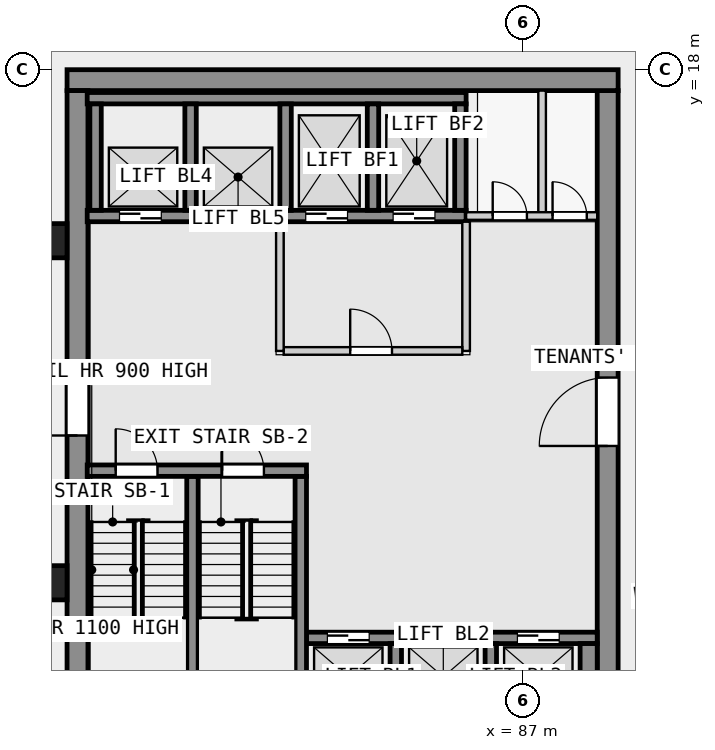
"""IFC4 building model, lengths in metres.
Left out: names, types, materials, properties, quantities, classifications, styles, units other than length and angle.
Written with IfcOpenShell. Run it as: python <this file> out.ifc"""

import sys

from ifc_helpers import new_model, si_unit, direction, frame, frame_2d, origin, origin_2d, place, context, subcontext, project, spatial, rectangle, extrude, element, fill, save


model = new_model("IFC4")
c1 = context("Model", 3, precision=1e-05, world=origin(), true_north=direction((0.0, 1.0)))
c2 = subcontext(c1, "Body", "Model", "MODEL_VIEW")
j1 = project(units=[si_unit("LENGTHUNIT", "METRE"), si_unit("PLANEANGLEUNIT", "RADIAN")], contexts=[c1])
p1 = place(None, origin())
s1 = spatial("IfcSite", under=j1, at=p1, CompositionType="ELEMENT")
p2 = place(p1, origin())
s2 = spatial("IfcBuilding", under=s1, at=p2, CompositionType="ELEMENT")
p3 = place(p2, frame((0.0, 0.0, 30.3)))
s3 = spatial("IfcBuildingStorey", under=s2, at=p3, CompositionType="ELEMENT", Elevation=30.3)
for number, where, z_axis, x_axis in (
    (1, (74.55, 13.5, 0.0), (0.0, 0.0, 1.0), (1.0, 0.0, 0.0)),
    (2, (74.55, 4.5, 0.0), (0.0, 0.0, 1.0), (1.0, 0.0, 0.0)),
):
    element("IfcColumn", number, at=place(p3, frame(where, z_axis=z_axis, x_axis=x_axis)), inside=s3, PredefinedType="COLUMN", context=c2, shape_type="SweptSolid", body=[
        extrude(rectangle(XDim=0.9, YDim=0.9, at=origin_2d()), origin(), (0.0, 0.0, 1.0), 3.5),
    ])
p4 = place(p3, frame((75.0, 17.725, 0.0), z_axis=(0.0, 0.0, 1.0), x_axis=(1.0, 0.0, 0.0)))
e3 = element("IfcWall", 3, at=p4, inside=s3, PredefinedType="SHEAR", context=c2, shape_type="SweptSolid", body=[
    extrude(rectangle(XDim=14.5, YDim=0.55, at=frame_2d((7.25, 0.0))), origin(), (0.0, 0.0, 1.0), 3.25),
])
p5 = place(p3, frame((75.275, 0.55, 0.0), z_axis=(0.0, 0.0, 1.0), x_axis=(0.0, 1.0, 0.0)))
e4 = element("IfcWall", 4, at=p5, inside=s3, PredefinedType="SHEAR", context=c2, shape_type="SweptSolid", body=[
    extrude(rectangle(XDim=16.9, YDim=0.55, at=frame_2d((8.45, 0.0))), origin(), (0.0, 0.0, 1.0), 3.25),
])
p6 = place(p5, frame((7.825, 0.0, 0.0)))
e5 = element("IfcOpeningElement", 5, at=p6, cuts=e4, PredefinedType="OPENING", context=c2, shape_type="SweptSolid", body=[
    extrude(rectangle(XDim=1.8, YDim=2.1, at=frame_2d((0.9, 1.05))), frame((0.0, 0.285, 0.0), z_axis=(0.0, -1.0, 0.0), x_axis=(1.0, 0.0, 0.0)), (0.0, 0.0, 1.0), 0.57),
])
p7 = place(p3, frame((89.225, 0.55, 0.0), z_axis=(0.0, 0.0, 1.0), x_axis=(0.0, 1.0, 0.0)))
e6 = element("IfcWall", 6, at=p7, inside=s3, PredefinedType="SHEAR", context=c2, shape_type="SweptSolid", body=[
    extrude(rectangle(XDim=16.9, YDim=0.55, at=frame_2d((8.45, 0.0))), origin(), (0.0, 0.0, 1.0), 3.25),
])
p8 = place(p7, frame((7.55, 0.0, 0.0)))
e7 = element("IfcOpeningElement", 7, at=p8, cuts=e6, PredefinedType="OPENING", context=c2, shape_type="SweptSolid", body=[
    extrude(rectangle(XDim=1.8, YDim=2.1, at=frame_2d((0.9, 1.05))), frame((0.0, 0.285, 0.0), z_axis=(0.0, -1.0, 0.0), x_axis=(1.0, 0.0, 0.0)), (0.0, 0.0, 1.0), 0.57),
])
p9 = place(p3, frame((75.53, 7.45, 0.0), z_axis=(0.0, 0.0, 1.0), x_axis=(1.0, 0.0, 0.0)))
e8 = element("IfcWall", 8, at=p9, inside=s3, PredefinedType="SHEAR", context=c2, shape_type="SweptSolid", body=[
    extrude(rectangle(XDim=5.77, YDim=0.3, at=frame_2d((2.885, 0.0))), origin(), (0.0, 0.0, 1.0), 3.25),
])
p10 = place(p9, frame((0.75, 0.0, 0.0)))
e9 = element("IfcOpeningElement", 9, at=p10, cuts=e8, PredefinedType="OPENING", context=c2, shape_type="SweptSolid", body=[
    extrude(rectangle(XDim=1.1, YDim=2.1, at=frame_2d((0.55, 1.05))), frame((0.0, 0.16, 0.0), z_axis=(0.0, -1.0, 0.0), x_axis=(1.0, 0.0, 0.0)), (0.0, 0.0, 1.0), 0.32),
])
p11 = place(p9, frame((3.55, 0.0, 0.0)))
e10 = element("IfcOpeningElement", 10, at=p11, cuts=e8, PredefinedType="OPENING", context=c2, shape_type="SweptSolid", body=[
    extrude(rectangle(XDim=1.1, YDim=2.1, at=frame_2d((0.55, 1.05))), frame((0.0, 0.16, 0.0), z_axis=(0.0, -1.0, 0.0), x_axis=(1.0, 0.0, 0.0)), (0.0, 0.0, 1.0), 0.32),
])
for number, where, z_axis, x_axis in (
    (11, (78.3, 0.9, 0.0), (0.0, 0.0, 1.0), (0.0, 1.0, 0.0)),
    (12, (81.15, 0.9, 0.0), (0.0, 0.0, 1.0), (0.0, 1.0, 0.0)),
):
    element("IfcWall", number, at=place(p3, frame(where, z_axis=z_axis, x_axis=x_axis)), inside=s3, PredefinedType="SHEAR", context=c2, shape_type="SweptSolid", body=[
        extrude(rectangle(XDim=6.4, YDim=0.3, at=frame_2d((3.2, 0.0))), origin(), (0.0, 0.0, 1.0), 3.25),
    ])
for number, where, z_axis, x_axis in (
    (13, (83.65, 0.9, 0.0), (0.0, 0.0, 1.0), (0.0, 1.0, 0.0)),
    (14, (86.15, 0.9, 0.0), (0.0, 0.0, 1.0), (0.0, 1.0, 0.0)),
):
    element("IfcWall", number, at=place(p3, frame(where, z_axis=z_axis, x_axis=x_axis)), inside=s3, PredefinedType="SHEAR", context=c2, shape_type="SweptSolid", body=[
        extrude(rectangle(XDim=2.0, YDim=0.3, at=frame_2d((1.0, 0.0))), origin(), (0.0, 0.0, 1.0), 3.25),
    ])
p12 = place(p3, frame((88.725, 0.9, 0.0), z_axis=(0.0, 0.0, 1.0), x_axis=(0.0, 1.0, 0.0)))
e15 = element("IfcWall", 15, at=p12, inside=s3, PredefinedType="SHEAR", context=c2, shape_type="SweptSolid", body=[
    extrude(rectangle(XDim=2.0, YDim=0.45, at=frame_2d((1.0, 0.0))), origin(), (0.0, 0.0, 1.0), 3.25),
])
p13 = place(p3, frame((81.3, 3.05, 0.0), z_axis=(0.0, 0.0, 1.0), x_axis=(1.0, 0.0, 0.0)))
e16 = element("IfcWall", 16, at=p13, inside=s3, PredefinedType="SHEAR", context=c2, shape_type="SweptSolid", body=[
    extrude(rectangle(XDim=7.65, YDim=0.3, at=frame_2d((3.825, 0.0))), origin(), (0.0, 0.0, 1.0), 3.25),
])
p14 = place(p13, frame((0.55, 0.0, 0.0)))
e17 = element("IfcOpeningElement", 17, at=p14, cuts=e16, PredefinedType="OPENING", context=c2, shape_type="SweptSolid", body=[
    extrude(rectangle(XDim=1.1, YDim=2.1, at=frame_2d((0.55, 1.05))), frame((0.0, 0.16, 0.0), z_axis=(0.0, -1.0, 0.0), x_axis=(1.0, 0.0, 0.0)), (0.0, 0.0, 1.0), 0.32),
])
p15 = place(p13, frame((3.05, 0.0, 0.0)))
e18 = element("IfcOpeningElement", 18, at=p15, cuts=e16, PredefinedType="OPENING", context=c2, shape_type="SweptSolid", body=[
    extrude(rectangle(XDim=1.1, YDim=2.1, at=frame_2d((0.55, 1.05))), frame((0.0, 0.16, 0.0), z_axis=(0.0, -1.0, 0.0), x_axis=(1.0, 0.0, 0.0)), (0.0, 0.0, 1.0), 0.32),
])
p16 = place(p13, frame((5.55, 0.0, 0.0)))
e19 = element("IfcOpeningElement", 19, at=p16, cuts=e16, PredefinedType="OPENING", context=c2, shape_type="SweptSolid", body=[
    extrude(rectangle(XDim=1.1, YDim=2.1, at=frame_2d((0.55, 1.05))), frame((0.0, 0.16, 0.0), z_axis=(0.0, -1.0, 0.0), x_axis=(1.0, 0.0, 0.0)), (0.0, 0.0, 1.0), 0.32),
])
p17 = place(p3, frame((75.53, 17.25, 0.0), z_axis=(0.0, 0.0, 1.0), x_axis=(1.0, 0.0, 0.0)))
e20 = element("IfcWall", 20, at=p17, inside=s3, PredefinedType="SHEAR", context=c2, shape_type="SweptSolid", body=[
    extrude(rectangle(XDim=9.97, YDim=0.3, at=frame_2d((4.985, 0.0))), origin(), (0.0, 0.0, 1.0), 3.25),
])
p18 = place(p3, frame((75.53, 14.15, 0.0), z_axis=(0.0, 0.0, 1.0), x_axis=(1.0, 0.0, 0.0)))
e21 = element("IfcWall", 21, at=p18, inside=s3, PredefinedType="SHEAR", context=c2, shape_type="SweptSolid", body=[
    extrude(rectangle(XDim=9.97, YDim=0.3, at=frame_2d((4.985, 0.0))), origin(), (0.0, 0.0, 1.0), 3.25),
])
p19 = place(p18, frame((0.85, 0.0, 0.0)))
e22 = element("IfcOpeningElement", 22, at=p19, cuts=e21, PredefinedType="OPENING", context=c2, shape_type="SweptSolid", body=[
    extrude(rectangle(XDim=1.1, YDim=2.1, at=frame_2d((0.55, 1.05))), frame((0.0, 0.16, 0.0), z_axis=(0.0, -1.0, 0.0), x_axis=(1.0, 0.0, 0.0)), (0.0, 0.0, 1.0), 0.32),
])
p20 = place(p18, frame((3.35, 0.0, 0.0)))
e23 = element("IfcOpeningElement", 23, at=p20, cuts=e21, PredefinedType="OPENING", context=c2, shape_type="SweptSolid", body=[
    extrude(rectangle(XDim=1.1, YDim=2.1, at=frame_2d((0.55, 1.05))), frame((0.0, 0.16, 0.0), z_axis=(0.0, -1.0, 0.0), x_axis=(1.0, 0.0, 0.0)), (0.0, 0.0, 1.0), 0.32),
])
p21 = place(p18, frame((5.75, 0.0, 0.0)))
e24 = element("IfcOpeningElement", 24, at=p21, cuts=e21, PredefinedType="OPENING", context=c2, shape_type="SweptSolid", body=[
    extrude(rectangle(XDim=1.1, YDim=2.1, at=frame_2d((0.55, 1.05))), frame((0.0, 0.16, 0.0), z_axis=(0.0, -1.0, 0.0), x_axis=(1.0, 0.0, 0.0)), (0.0, 0.0, 1.0), 0.32),
])
p22 = place(p18, frame((8.05, 0.0, 0.0)))
e25 = element("IfcOpeningElement", 25, at=p22, cuts=e21, PredefinedType="OPENING", context=c2, shape_type="SweptSolid", body=[
    extrude(rectangle(XDim=1.1, YDim=2.1, at=frame_2d((0.55, 1.05))), frame((0.0, 0.16, 0.0), z_axis=(0.0, -1.0, 0.0), x_axis=(1.0, 0.0, 0.0)), (0.0, 0.0, 1.0), 0.32),
])
for number, where, z_axis, x_axis in (
    (26, (75.75, 14.3, 0.0), (0.0, 0.0, 1.0), (0.0, 1.0, 0.0)),
    (27, (78.25, 14.3, 0.0), (0.0, 0.0, 1.0), (0.0, 1.0, 0.0)),
    (28, (80.75, 14.3, 0.0), (0.0, 0.0, 1.0), (0.0, 1.0, 0.0)),
    (29, (83.05, 14.3, 0.0), (0.0, 0.0, 1.0), (0.0, 1.0, 0.0)),
    (30, (85.35, 14.3, 0.0), (0.0, 0.0, 1.0), (0.0, 1.0, 0.0)),
):
    element("IfcWall", number, at=place(p3, frame(where, z_axis=z_axis, x_axis=x_axis)), inside=s3, PredefinedType="SHEAR", context=c2, shape_type="SweptSolid", body=[
        extrude(rectangle(XDim=2.8, YDim=0.3, at=frame_2d((1.4, 0.0))), origin(), (0.0, 0.0, 1.0), 3.25),
    ])
p23 = place(p3, frame((80.6, 10.6, 0.0), z_axis=(0.0, 0.0, 1.0), x_axis=(0.0, 1.0, 0.0)))
e31 = element("IfcWall", 31, at=p23, inside=s3, PredefinedType="PARTITIONING", context=c2, shape_type="SweptSolid", body=[
    extrude(rectangle(XDim=3.4, YDim=0.2, at=frame_2d((1.7, 0.0))), origin(), (0.0, 0.0, 1.0), 3.25),
])
p24 = place(p3, frame((80.7, 10.6, 0.0), z_axis=(0.0, 0.0, 1.0), x_axis=(1.0, 0.0, 0.0)))
e32 = element("IfcWall", 32, at=p24, inside=s3, PredefinedType="PARTITIONING", context=c2, shape_type="SweptSolid", body=[
    extrude(rectangle(XDim=4.7, YDim=0.2, at=frame_2d((2.35, 0.0))), origin(), (0.0, 0.0, 1.0), 3.25),
])
p25 = place(p24, frame((1.75, 0.0, 0.0)))
e33 = element("IfcOpeningElement", 33, at=p25, cuts=e32, PredefinedType="OPENING", context=c2, shape_type="SweptSolid", body=[
    extrude(rectangle(XDim=1.1, YDim=2.1, at=frame_2d((0.55, 1.05))), frame((0.0, 0.11, 0.0), z_axis=(0.0, -1.0, 0.0), x_axis=(1.0, 0.0, 0.0)), (0.0, 0.0, 1.0), 0.22),
])
p26 = place(p3, frame((85.5, 10.6, 0.0), z_axis=(0.0, 0.0, 1.0), x_axis=(0.0, 1.0, 0.0)))
e34 = element("IfcWall", 34, at=p26, inside=s3, PredefinedType="PARTITIONING", context=c2, shape_type="SweptSolid", body=[
    extrude(rectangle(XDim=3.4, YDim=0.2, at=frame_2d((1.7, 0.0))), origin(), (0.0, 0.0, 1.0), 3.25),
])
p27 = place(p3, frame((85.5, 14.15, 0.0), z_axis=(0.0, 0.0, 1.0), x_axis=(1.0, 0.0, 0.0)))
e35 = element("IfcWall", 35, at=p27, inside=s3, PredefinedType="PARTITIONING", context=c2, shape_type="SweptSolid", body=[
    extrude(rectangle(XDim=3.45, YDim=0.2, at=frame_2d((1.725, 0.0))), origin(), (0.0, 0.0, 1.0), 3.25),
])
p28 = place(p27, frame((0.7, 0.0, 0.0)))
e36 = element("IfcOpeningElement", 36, at=p28, cuts=e35, PredefinedType="OPENING", context=c2, shape_type="SweptSolid", body=[
    extrude(rectangle(XDim=0.9, YDim=2.1, at=frame_2d((0.45, 1.05))), frame((0.0, 0.11, 0.0), z_axis=(0.0, -1.0, 0.0), x_axis=(1.0, 0.0, 0.0)), (0.0, 0.0, 1.0), 0.22),
])
p29 = place(p27, frame((2.275, 0.0, 0.0)))
e37 = element("IfcOpeningElement", 37, at=p29, cuts=e35, PredefinedType="OPENING", context=c2, shape_type="SweptSolid", body=[
    extrude(rectangle(XDim=0.9, YDim=2.1, at=frame_2d((0.45, 1.05))), frame((0.0, 0.11, 0.0), z_axis=(0.0, -1.0, 0.0), x_axis=(1.0, 0.0, 0.0)), (0.0, 0.0, 1.0), 0.22),
])
p30 = place(p3, frame((87.5, 14.25, 0.0), z_axis=(0.0, 0.0, 1.0), x_axis=(0.0, 1.0, 0.0)))
e38 = element("IfcWall", 38, at=p30, inside=s3, PredefinedType="PARTITIONING", context=c2, shape_type="SweptSolid", body=[
    extrude(rectangle(XDim=3.2, YDim=0.2, at=frame_2d((1.6, 0.0))), origin(), (0.0, 0.0, 1.0), 3.25),
])
p31 = place(p25, origin())
e39 = element("IfcDoor", 39, at=p31, inside=s3, OperationType="SINGLE_SWING_LEFT", PredefinedType="DOOR", context=c2, shape_type="SweptSolid", body=[
    extrude(rectangle(XDim=1.1, YDim=2.1, at=frame_2d((0.55, 1.05))), frame((0.0, 0.025, 0.0), z_axis=(0.0, -1.0, 0.0), x_axis=(1.0, 0.0, 0.0)), (0.0, 0.0, 1.0), 0.05),
])
fill(e33, e39)
p32 = place(p14, origin())
e40 = element("IfcDoor", 40, at=p32, inside=s3, OperationType="DOUBLE_DOOR_SLIDING", PredefinedType="DOOR", context=c2, shape_type="SweptSolid", body=[
    extrude(rectangle(XDim=1.1, YDim=2.1, at=frame_2d((0.55, 1.05))), frame((0.0, 0.025, 0.0), z_axis=(0.0, -1.0, 0.0), x_axis=(1.0, 0.0, 0.0)), (0.0, 0.0, 1.0), 0.05),
])
fill(e17, e40)
p33 = place(p15, origin())
e41 = element("IfcDoor", 41, at=p33, inside=s3, OperationType="DOUBLE_DOOR_SLIDING", PredefinedType="DOOR", context=c2, shape_type="SweptSolid", body=[
    extrude(rectangle(XDim=1.1, YDim=2.1, at=frame_2d((0.55, 1.05))), frame((0.0, 0.025, 0.0), z_axis=(0.0, -1.0, 0.0), x_axis=(1.0, 0.0, 0.0)), (0.0, 0.0, 1.0), 0.05),
])
fill(e18, e41)
p34 = place(p16, origin())
e42 = element("IfcDoor", 42, at=p34, inside=s3, OperationType="DOUBLE_DOOR_SLIDING", PredefinedType="DOOR", context=c2, shape_type="SweptSolid", body=[
    extrude(rectangle(XDim=1.1, YDim=2.1, at=frame_2d((0.55, 1.05))), frame((0.0, 0.025, 0.0), z_axis=(0.0, -1.0, 0.0), x_axis=(1.0, 0.0, 0.0)), (0.0, 0.0, 1.0), 0.05),
])
fill(e19, e42)
p35 = place(p19, origin())
e43 = element("IfcDoor", 43, at=p35, inside=s3, OperationType="DOUBLE_DOOR_SLIDING", PredefinedType="DOOR", context=c2, shape_type="SweptSolid", body=[
    extrude(rectangle(XDim=1.1, YDim=2.1, at=frame_2d((0.55, 1.05))), frame((0.0, 0.025, 0.0), z_axis=(0.0, -1.0, 0.0), x_axis=(1.0, 0.0, 0.0)), (0.0, 0.0, 1.0), 0.05),
])
fill(e22, e43)
p36 = place(p20, origin())
e44 = element("IfcDoor", 44, at=p36, inside=s3, OperationType="DOUBLE_DOOR_SLIDING", PredefinedType="DOOR", context=c2, shape_type="SweptSolid", body=[
    extrude(rectangle(XDim=1.1, YDim=2.1, at=frame_2d((0.55, 1.05))), frame((0.0, 0.025, 0.0), z_axis=(0.0, -1.0, 0.0), x_axis=(1.0, 0.0, 0.0)), (0.0, 0.0, 1.0), 0.05),
])
fill(e23, e44)
p37 = place(p21, origin())
e45 = element("IfcDoor", 45, at=p37, inside=s3, OperationType="DOUBLE_DOOR_SLIDING", PredefinedType="DOOR", context=c2, shape_type="SweptSolid", body=[
    extrude(rectangle(XDim=1.1, YDim=2.1, at=frame_2d((0.55, 1.05))), frame((0.0, 0.025, 0.0), z_axis=(0.0, -1.0, 0.0), x_axis=(1.0, 0.0, 0.0)), (0.0, 0.0, 1.0), 0.05),
])
fill(e24, e45)
p38 = place(p22, origin())
e46 = element("IfcDoor", 46, at=p38, inside=s3, OperationType="DOUBLE_DOOR_SLIDING", PredefinedType="DOOR", context=c2, shape_type="SweptSolid", body=[
    extrude(rectangle(XDim=1.1, YDim=2.1, at=frame_2d((0.55, 1.05))), frame((0.0, 0.025, 0.0), z_axis=(0.0, -1.0, 0.0), x_axis=(1.0, 0.0, 0.0)), (0.0, 0.0, 1.0), 0.05),
])
fill(e25, e46)
p39 = place(p10, origin())
e47 = element("IfcDoor", 47, at=p39, inside=s3, OperationType="SINGLE_SWING_RIGHT", PredefinedType="DOOR", context=c2, shape_type="SweptSolid", body=[
    extrude(rectangle(XDim=1.1, YDim=2.1, at=frame_2d((0.55, 1.05))), frame((0.0, 0.025, 0.0), z_axis=(0.0, -1.0, 0.0), x_axis=(1.0, 0.0, 0.0)), (0.0, 0.0, 1.0), 0.05),
])
fill(e9, e47)
p40 = place(p11, origin())
e48 = element("IfcDoor", 48, at=p40, inside=s3, OperationType="SINGLE_SWING_LEFT", PredefinedType="DOOR", context=c2, shape_type="SweptSolid", body=[
    extrude(rectangle(XDim=1.1, YDim=2.1, at=frame_2d((0.55, 1.05))), frame((0.0, 0.025, 0.0), z_axis=(0.0, -1.0, 0.0), x_axis=(1.0, 0.0, 0.0)), (0.0, 0.0, 1.0), 0.05),
])
fill(e10, e48)
p41 = place(p6, origin())
e49 = element("IfcDoor", 49, at=p41, inside=s3, OperationType="DOUBLE_DOOR_SINGLE_SWING", PredefinedType="DOOR", context=c2, shape_type="SweptSolid", body=[
    extrude(rectangle(XDim=1.8, YDim=2.1, at=frame_2d((0.9, 1.05))), frame((0.0, 0.025, 0.0), z_axis=(0.0, -1.0, 0.0), x_axis=(1.0, 0.0, 0.0)), (0.0, 0.0, 1.0), 0.05),
])
fill(e5, e49)
p42 = place(p8, origin())
e50 = element("IfcDoor", 50, at=p42, inside=s3, OperationType="DOUBLE_DOOR_SINGLE_SWING", PredefinedType="DOOR", context=c2, shape_type="SweptSolid", body=[
    extrude(rectangle(XDim=1.8, YDim=2.1, at=frame_2d((0.9, 1.05))), frame((0.0, 0.025, 0.0), z_axis=(0.0, -1.0, 0.0), x_axis=(1.0, 0.0, 0.0)), (0.0, 0.0, 1.0), 0.05),
])
fill(e7, e50)
p43 = place(p28, origin())
e51 = element("IfcDoor", 51, at=p43, inside=s3, OperationType="SINGLE_SWING_LEFT", PredefinedType="DOOR", context=c2, shape_type="SweptSolid", body=[
    extrude(rectangle(XDim=0.9, YDim=2.1, at=frame_2d((0.45, 1.05))), frame((0.0, 0.025, 0.0), z_axis=(0.0, -1.0, 0.0), x_axis=(1.0, 0.0, 0.0)), (0.0, 0.0, 1.0), 0.05),
])
fill(e36, e51)
p44 = place(p29, origin())
e52 = element("IfcDoor", 52, at=p44, inside=s3, OperationType="SINGLE_SWING_LEFT", PredefinedType="DOOR", context=c2, shape_type="SweptSolid", body=[
    extrude(rectangle(XDim=0.9, YDim=2.1, at=frame_2d((0.45, 1.05))), frame((0.0, 0.025, 0.0), z_axis=(0.0, -1.0, 0.0), x_axis=(1.0, 0.0, 0.0)), (0.0, 0.0, 1.0), 0.05),
])
fill(e37, e52)
save(model, sys.argv[1])
